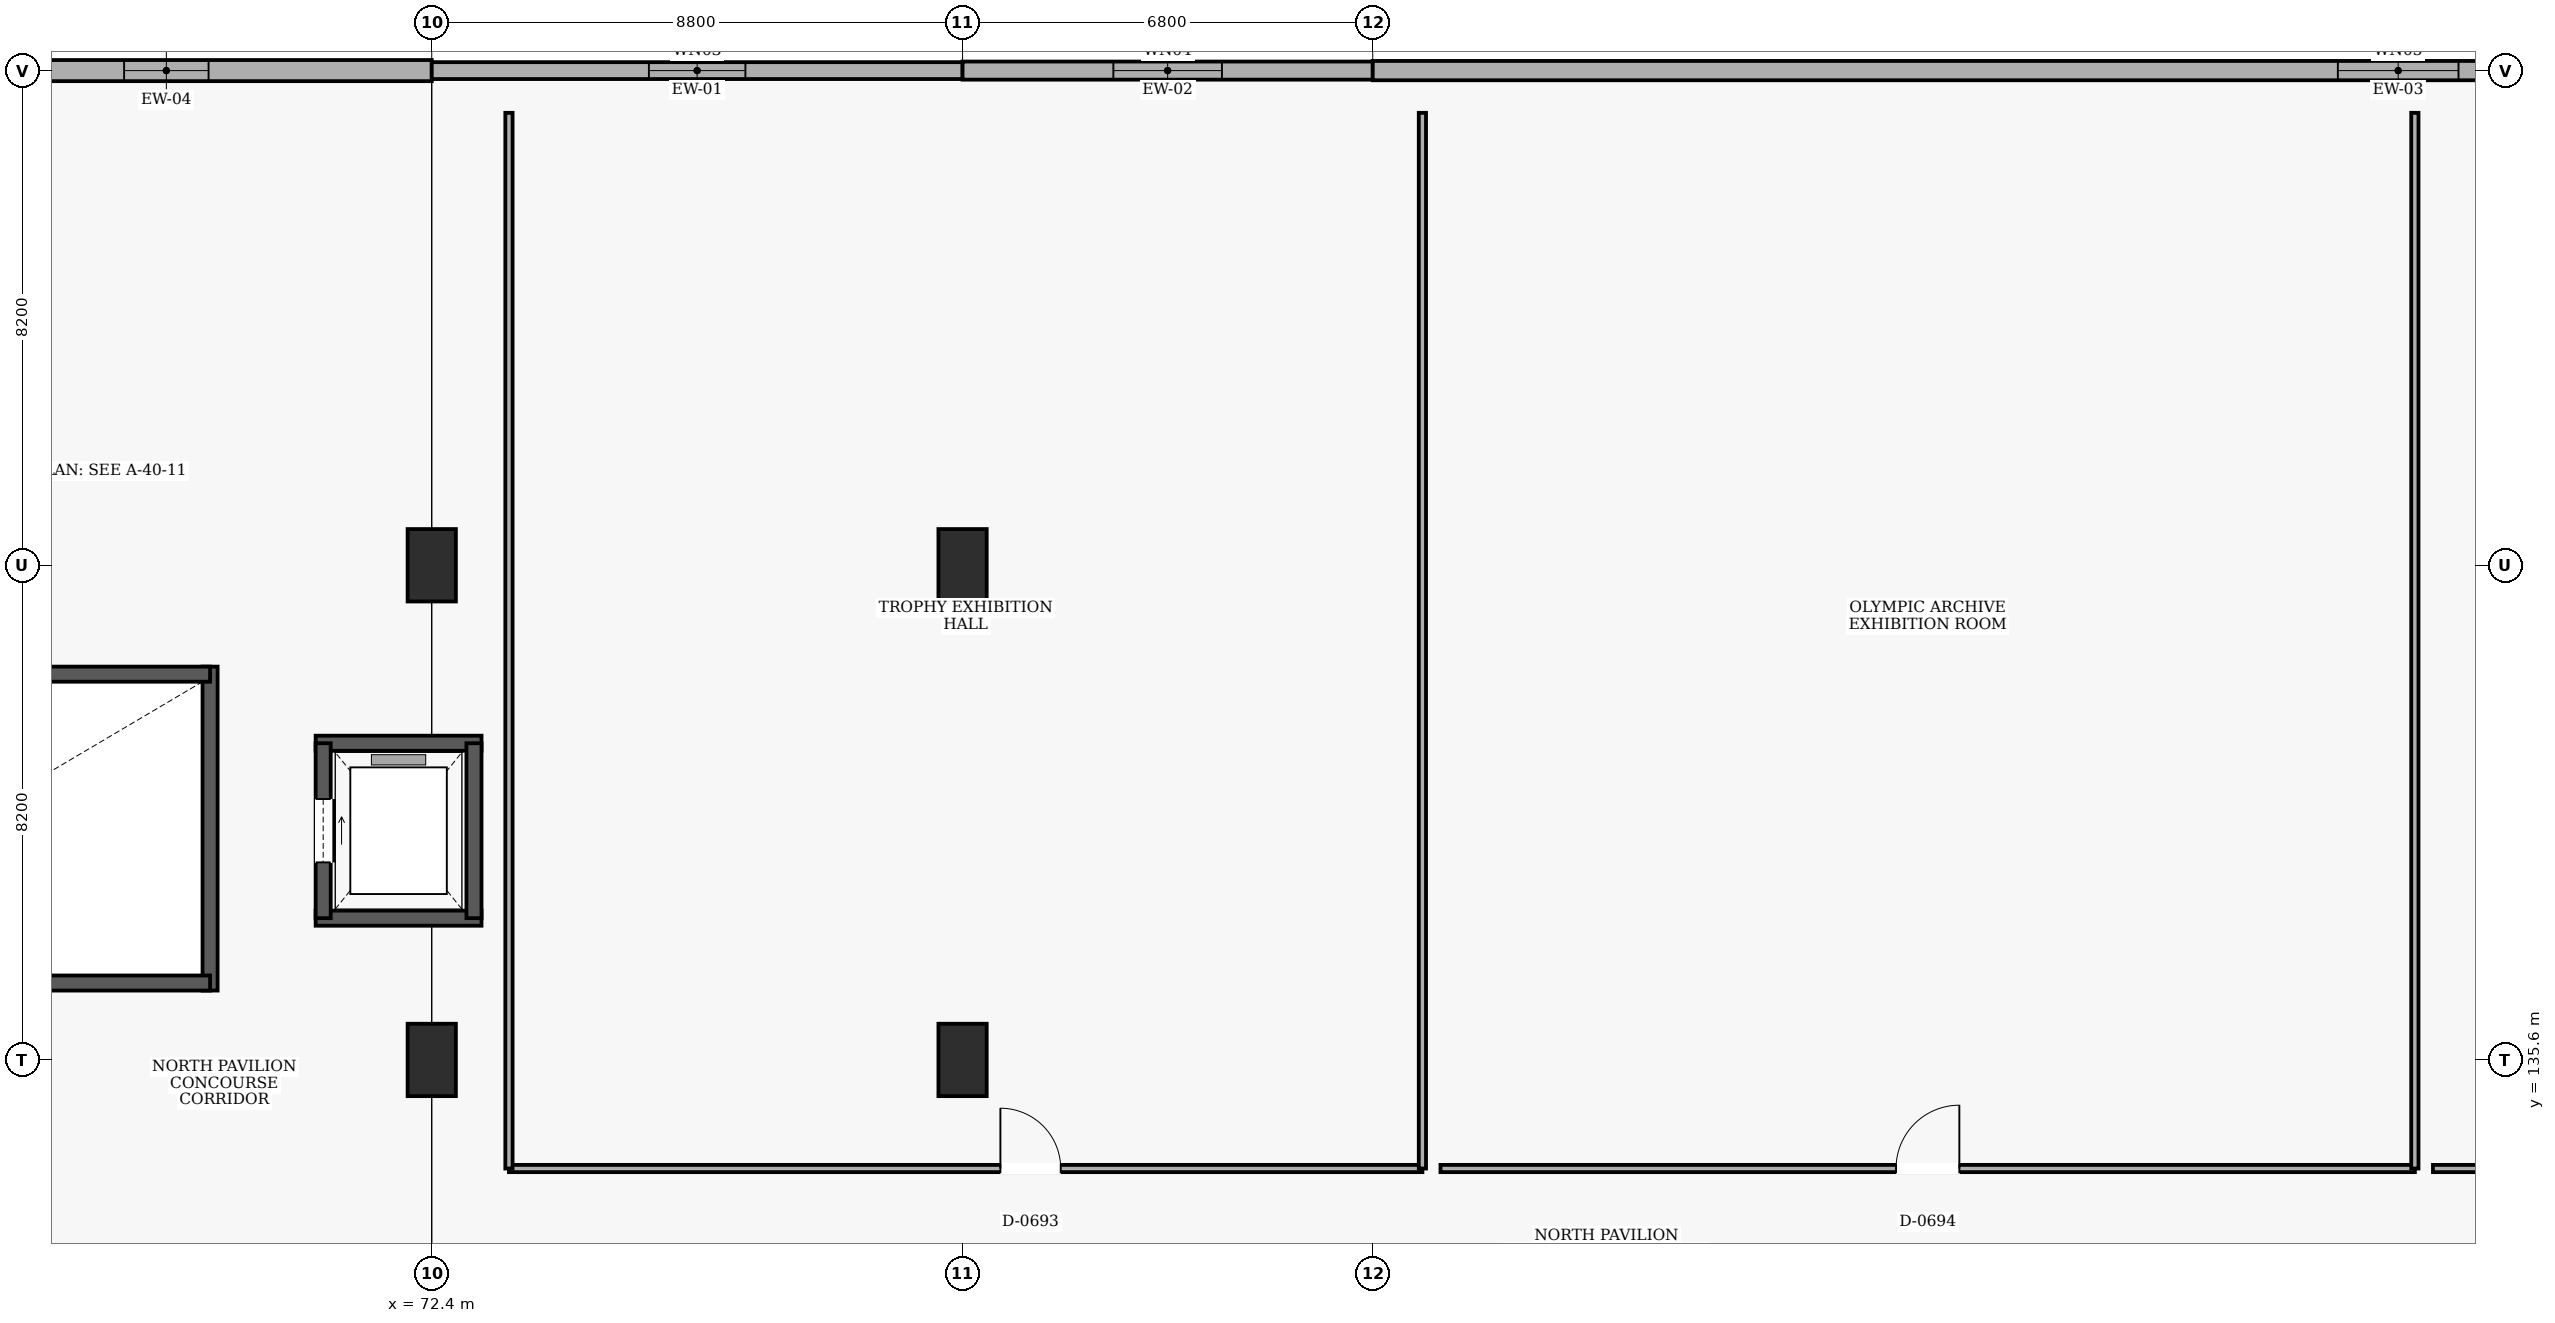
"""IFC4 building model, lengths in metres.
Left out: names, types, materials, properties, quantities, classifications, styles, units other than length and angle.
Written with IfcOpenShell. Run it as: python <this file> out.ifc"""

import sys

from ifc_helpers import new_model, si_unit, direction, frame, frame_2d, origin, origin_2d, place, context, subcontext, project, spatial, rectangle, extrude, element, fill, save


model = new_model("IFC4")
c1 = context("Model", 3, precision=1e-05, world=origin(), true_north=direction((0.0, 1.0)))
c2 = subcontext(c1, "Body", "Model", "MODEL_VIEW")
j1 = project(units=[si_unit("LENGTHUNIT", "METRE"), si_unit("PLANEANGLEUNIT", "RADIAN")], contexts=[c1])
p1 = place(None, origin())
s1 = spatial("IfcSite", under=j1, at=p1, CompositionType="ELEMENT")
p2 = place(p1, origin())
s2 = spatial("IfcBuilding", under=s1, at=p2, CompositionType="ELEMENT")
p3 = place(p2, frame((0.0, 0.0, 15.0)))
s3 = spatial("IfcBuildingStorey", under=s2, at=p3, CompositionType="ELEMENT", Elevation=15.0)
for number, where, z_axis, x_axis in (
    (1, (72.4, 135.6, 0.0), (0.0, 0.0, 1.0), (1.0, 0.0, 0.0)),
    (2, (72.4, 143.8, 0.0), (0.0, 0.0, 1.0), (1.0, 0.0, 0.0)),
    (3, (81.2, 135.6, 0.0), (0.0, 0.0, 1.0), (1.0, 0.0, 0.0)),
    (4, (81.2, 143.8, 0.0), (0.0, 0.0, 1.0), (1.0, 0.0, 0.0)),
):
    element("IfcColumn", number, at=place(p3, frame(where, z_axis=z_axis, x_axis=x_axis)), inside=s3, PredefinedType="COLUMN", context=c2, shape_type="SweptSolid", body=[
        extrude(rectangle(XDim=0.8, YDim=1.2, at=origin_2d()), origin(), (0.0, 0.0, 1.0), 4.8),
    ])
p4 = place(p3, frame((63.6, 152.0, 0.0), z_axis=(0.0, 0.0, 1.0), x_axis=(1.0, 0.0, 0.0)))
e5 = element("IfcWall", 5, at=p4, inside=s3, PredefinedType="SOLIDWALL", context=c2, shape_type="SweptSolid", body=[
    extrude(rectangle(XDim=8.8, YDim=0.35, at=frame_2d((4.4, 0.0))), origin(), (0.0, 0.0, 1.0), 4.48),
])
p5 = place(p4, frame((3.7, 0.0, 0.9)))
e6 = element("IfcOpeningElement", 6, at=p5, cuts=e5, PredefinedType="OPENING", context=c2, shape_type="SweptSolid", body=[
    extrude(rectangle(XDim=1.4, YDim=1.5, at=frame_2d((0.7, 0.75))), frame((0.0, 0.185, 0.0), z_axis=(0.0, -1.0, 0.0), x_axis=(1.0, 0.0, 0.0)), (0.0, 0.0, 1.0), 0.37),
])
p6 = place(p3, frame((72.4, 152.0, 0.0), z_axis=(0.0, 0.0, 1.0), x_axis=(1.0, 0.0, 0.0)))
e7 = element("IfcWall", 7, at=p6, inside=s3, PredefinedType="SOLIDWALL", context=c2, shape_type="SweptSolid", body=[
    extrude(rectangle(XDim=8.8, YDim=0.28, at=frame_2d((4.4, 0.0))), origin(), (0.0, 0.0, 1.0), 4.48),
])
p7 = place(p6, frame((3.6, 0.0, 0.9)))
e8 = element("IfcOpeningElement", 8, at=p7, cuts=e7, PredefinedType="OPENING", context=c2, shape_type="SweptSolid", body=[
    extrude(rectangle(XDim=1.6, YDim=1.5, at=frame_2d((0.8, 0.75))), frame((0.0, 0.15, 0.0), z_axis=(0.0, -1.0, 0.0), x_axis=(1.0, 0.0, 0.0)), (0.0, 0.0, 1.0), 0.3),
])
p8 = place(p3, frame((81.2, 152.0, 0.0), z_axis=(0.0, 0.0, 1.0), x_axis=(1.0, 0.0, 0.0)))
e9 = element("IfcWall", 9, at=p8, inside=s3, PredefinedType="SOLIDWALL", context=c2, shape_type="SweptSolid", body=[
    extrude(rectangle(XDim=6.8, YDim=0.3, at=frame_2d((3.4, 0.0))), origin(), (0.0, 0.0, 1.0), 4.48),
])
p9 = place(p8, frame((2.5, 0.0, 0.9)))
e10 = element("IfcOpeningElement", 10, at=p9, cuts=e9, PredefinedType="OPENING", context=c2, shape_type="SweptSolid", body=[
    extrude(rectangle(XDim=1.8, YDim=1.5, at=frame_2d((0.9, 0.75))), frame((0.0, 0.16, 0.0), z_axis=(0.0, -1.0, 0.0), x_axis=(1.0, 0.0, 0.0)), (0.0, 0.0, 1.0), 0.32),
])
p10 = place(p3, frame((88.0, 152.0, 0.0), z_axis=(0.0, 0.0, 1.0), x_axis=(1.0, 0.0, 0.0)))
e11 = element("IfcWall", 11, at=p10, inside=s3, PredefinedType="SOLIDWALL", context=c2, shape_type="SweptSolid", body=[
    extrude(rectangle(XDim=34.0, YDim=0.32, at=frame_2d((17.0, 0.0))), origin(), (0.0, 0.0, 1.0), 4.48),
])
p11 = place(p10, frame((16.0, 0.0, 0.9)))
e12 = element("IfcOpeningElement", 12, at=p11, cuts=e11, PredefinedType="OPENING", context=c2, shape_type="SweptSolid", body=[
    extrude(rectangle(XDim=2.0, YDim=1.5, at=frame_2d((1.0, 0.75))), frame((0.0, 0.17, 0.0), z_axis=(0.0, -1.0, 0.0), x_axis=(1.0, 0.0, 0.0)), (0.0, 0.0, 1.0), 0.34),
])
p12 = place(p3, frame((68.725, 136.75, 0.0), z_axis=(0.0, 0.0, 1.0), x_axis=(0.0, 1.0, 0.0)))
e13 = element("IfcWall", 13, at=p12, inside=s3, PredefinedType="SHEAR", context=c2, shape_type="SweptSolid", body=[
    extrude(rectangle(XDim=5.37, YDim=0.25, at=frame_2d((2.685, 0.0))), origin(), (0.0, 0.0, 1.0), 4.5),
])
p13 = place(p3, frame((57.875, 141.995, 0.0), z_axis=(0.0, 0.0, 1.0), x_axis=(1.0, 0.0, 0.0)))
e14 = element("IfcWall", 14, at=p13, inside=s3, PredefinedType="SHEAR", context=c2, shape_type="SweptSolid", body=[
    extrude(rectangle(XDim=10.85, YDim=0.25, at=frame_2d((5.425, 0.0))), origin(), (0.0, 0.0, 1.0), 4.5),
])
p14 = place(p3, frame((57.875, 136.875, 0.0), z_axis=(0.0, 0.0, 1.0), x_axis=(1.0, 0.0, 0.0)))
e15 = element("IfcWall", 15, at=p14, inside=s3, PredefinedType="SHEAR", context=c2, shape_type="SweptSolid", body=[
    extrude(rectangle(XDim=10.85, YDim=0.25, at=frame_2d((5.425, 0.0))), origin(), (0.0, 0.0, 1.0), 4.5),
])
p15 = place(p14, frame((0.52, 0.0, 0.0)))
e16 = element("IfcOpeningElement", 16, at=p15, cuts=e15, PredefinedType="OPENING", context=c2, shape_type="SweptSolid", body=[
    extrude(rectangle(XDim=1.4, YDim=2.15, at=frame_2d((0.7, 1.075))), frame((0.0, 0.135, 0.0), z_axis=(0.0, -1.0, 0.0), x_axis=(1.0, 0.0, 0.0)), (0.0, 0.0, 1.0), 0.27),
])
for number, where, z_axis, x_axis in (
    (17, (70.475, 137.95, 0.0), (0.0, 0.0, 1.0), (1.0, 0.0, 0.0)),
    (18, (73.225, 140.85, 0.0), (0.0, 0.0, 1.0), (-1.0, 0.0, 0.0)),
):
    element("IfcWall", number, at=place(p3, frame(where, z_axis=z_axis, x_axis=x_axis)), inside=s3, PredefinedType="SHEAR", context=c2, shape_type="SweptSolid", body=[
        extrude(rectangle(XDim=2.75, YDim=0.25, at=frame_2d((1.375, 0.0))), origin(), (0.0, 0.0, 1.0), 4.5),
    ])
p16 = place(p3, frame((70.6, 140.85, 0.0), z_axis=(0.0, 0.0, 1.0), x_axis=(0.0, -1.0, 0.0)))
e19 = element("IfcWall", 19, at=p16, inside=s3, PredefinedType="SHEAR", context=c2, shape_type="SweptSolid", body=[
    extrude(rectangle(XDim=2.9, YDim=0.25, at=frame_2d((1.45, 0.0))), origin(), (0.0, 0.0, 1.0), 4.5),
])
p17 = place(p16, frame((0.925, 0.0, 0.0)))
e20 = element("IfcOpeningElement", 20, at=p17, cuts=e19, PredefinedType="OPENING", context=c2, shape_type="SweptSolid", body=[
    extrude(rectangle(XDim=1.05, YDim=2.15, at=frame_2d((0.525, 1.075))), frame((0.0, 0.135, 0.0), z_axis=(0.0, -1.0, 0.0), x_axis=(1.0, 0.0, 0.0)), (0.0, 0.0, 1.0), 0.27),
])
p18 = place(p3, frame((73.1, 137.95, 0.0), z_axis=(0.0, 0.0, 1.0), x_axis=(0.0, 1.0, 0.0)))
e21 = element("IfcWall", 21, at=p18, inside=s3, PredefinedType="SHEAR", context=c2, shape_type="SweptSolid", body=[
    extrude(rectangle(XDim=2.9, YDim=0.25, at=frame_2d((1.45, 0.0))), origin(), (0.0, 0.0, 1.0), 4.5),
])
p19 = place(p3, frame((73.68, 133.8, 0.0), z_axis=(0.0, 0.0, 1.0), x_axis=(1.0, 0.0, 0.0)))
e22 = element("IfcWall", 22, at=p19, inside=s3, PredefinedType="PARTITIONING", context=c2, shape_type="SweptSolid", body=[
    extrude(rectangle(XDim=15.143, YDim=0.12, at=frame_2d((7.572, 0.0))), origin(), (0.0, 0.0, 1.0), 4.5),
])
p20 = place(p19, frame((8.147, 0.0, 0.0)))
e23 = element("IfcOpeningElement", 23, at=p20, cuts=e22, PredefinedType="OPENING", context=c2, shape_type="SweptSolid", body=[
    extrude(rectangle(XDim=1.0, YDim=2.1, at=frame_2d((0.5, 1.05))), frame((0.0, 0.07, 0.0), z_axis=(0.0, -1.0, 0.0), x_axis=(1.0, 0.0, 0.0)), (0.0, 0.0, 1.0), 0.14),
])
for number, where, z_axis, x_axis in (
    (24, (88.823, 133.8, 0.0), (0.0, 0.0, 1.0), (0.0, 1.0, 0.0)),
    (25, (73.68, 151.3, 0.0), (0.0, 0.0, 1.0), (0.0, -1.0, 0.0)),
):
    element("IfcWall", number, at=place(p3, frame(where, z_axis=z_axis, x_axis=x_axis)), inside=s3, PredefinedType="PARTITIONING", context=c2, shape_type="SweptSolid", body=[
        extrude(rectangle(XDim=17.5, YDim=0.12, at=frame_2d((8.75, 0.0))), origin(), (0.0, 0.0, 1.0), 4.5),
    ])
p21 = place(p3, frame((89.123, 133.8, 0.0), z_axis=(0.0, 0.0, 1.0), x_axis=(1.0, 0.0, 0.0)))
e26 = element("IfcWall", 26, at=p21, inside=s3, PredefinedType="PARTITIONING", context=c2, shape_type="SweptSolid", body=[
    extrude(rectangle(XDim=16.153, YDim=0.12, at=frame_2d((8.077, 0.0))), origin(), (0.0, 0.0, 1.0), 4.5),
])
p22 = place(p21, frame((7.552, 0.0, 0.0)))
e27 = element("IfcOpeningElement", 27, at=p22, cuts=e26, PredefinedType="OPENING", context=c2, shape_type="SweptSolid", body=[
    extrude(rectangle(XDim=1.05, YDim=2.15, at=frame_2d((0.525, 1.075))), frame((0.0, 0.07, 0.0), z_axis=(0.0, -1.0, 0.0), x_axis=(1.0, 0.0, 0.0)), (0.0, 0.0, 1.0), 0.14),
])
p23 = place(p3, frame((105.277, 133.8, 0.0), z_axis=(0.0, 0.0, 1.0), x_axis=(0.0, 1.0, 0.0)))
e28 = element("IfcWall", 28, at=p23, inside=s3, PredefinedType="PARTITIONING", context=c2, shape_type="SweptSolid", body=[
    extrude(rectangle(XDim=17.5, YDim=0.12, at=frame_2d((8.75, 0.0))), origin(), (0.0, 0.0, 1.0), 4.5),
])
p24 = place(p3, frame((105.577, 133.8, 0.0), z_axis=(0.0, 0.0, 1.0), x_axis=(1.0, 0.0, 0.0)))
e29 = element("IfcWall", 29, at=p24, inside=s3, PredefinedType="PARTITIONING", context=c2, shape_type="SweptSolid", body=[
    extrude(rectangle(XDim=16.153, YDim=0.12, at=frame_2d((8.077, 0.0))), origin(), (0.0, 0.0, 1.0), 4.5),
])
p25 = place(p24, frame((7.517, 0.0, 0.0)))
e30 = element("IfcOpeningElement", 30, at=p25, cuts=e29, PredefinedType="OPENING", context=c2, shape_type="SweptSolid", body=[
    extrude(rectangle(XDim=1.12, YDim=2.15, at=frame_2d((0.56, 1.075))), frame((0.0, 0.07, 0.0), z_axis=(0.0, -1.0, 0.0), x_axis=(1.0, 0.0, 0.0)), (0.0, 0.0, 1.0), 0.14),
])
p26 = place(p5, origin())
e31 = element("IfcWindow", 31, at=p26, inside=s3, PartitioningType="SINGLE_PANEL", PredefinedType="WINDOW", context=c2, shape_type="SweptSolid", body=[
    extrude(rectangle(XDim=1.4, YDim=1.5, at=frame_2d((0.7, 0.75))), frame((0.0, 0.03, 0.0), z_axis=(0.0, -1.0, 0.0), x_axis=(1.0, 0.0, 0.0)), (0.0, 0.0, 1.0), 0.06),
])
fill(e6, e31)
p27 = place(p7, origin())
e32 = element("IfcWindow", 32, at=p27, inside=s3, PartitioningType="SINGLE_PANEL", PredefinedType="WINDOW", context=c2, shape_type="SweptSolid", body=[
    extrude(rectangle(XDim=1.6, YDim=1.5, at=frame_2d((0.8, 0.75))), frame((0.0, 0.03, 0.0), z_axis=(0.0, -1.0, 0.0), x_axis=(1.0, 0.0, 0.0)), (0.0, 0.0, 1.0), 0.06),
])
fill(e8, e32)
p28 = place(p9, origin())
e33 = element("IfcWindow", 33, at=p28, inside=s3, PartitioningType="SINGLE_PANEL", PredefinedType="WINDOW", context=c2, shape_type="SweptSolid", body=[
    extrude(rectangle(XDim=1.8, YDim=1.5, at=frame_2d((0.9, 0.75))), frame((0.0, 0.03, 0.0), z_axis=(0.0, -1.0, 0.0), x_axis=(1.0, 0.0, 0.0)), (0.0, 0.0, 1.0), 0.06),
])
fill(e10, e33)
p29 = place(p11, origin())
e34 = element("IfcWindow", 34, at=p29, inside=s3, PartitioningType="SINGLE_PANEL", PredefinedType="WINDOW", context=c2, shape_type="SweptSolid", body=[
    extrude(rectangle(XDim=2.0, YDim=1.5, at=frame_2d((1.0, 0.75))), frame((0.0, 0.03, 0.0), z_axis=(0.0, -1.0, 0.0), x_axis=(1.0, 0.0, 0.0)), (0.0, 0.0, 1.0), 0.06),
])
fill(e12, e34)
p30 = place(p17, origin())
e35 = element("IfcDoor", 35, at=p30, inside=s3, OperationType="SLIDING_TO_RIGHT", PredefinedType="DOOR", context=c2, shape_type="SweptSolid", body=[
    extrude(rectangle(XDim=1.05, YDim=2.15, at=frame_2d((0.525, 1.075))), frame((0.0, 0.025, 0.0), z_axis=(0.0, -1.0, 0.0), x_axis=(1.0, 0.0, 0.0)), (0.0, 0.0, 1.0), 0.05),
])
fill(e20, e35)
p31 = place(p20, origin())
e36 = element("IfcDoor", 36, at=p31, inside=s3, OperationType="SINGLE_SWING_LEFT", PredefinedType="DOOR", context=c2, shape_type="SweptSolid", body=[
    extrude(rectangle(XDim=1.0, YDim=2.1, at=frame_2d((0.5, 1.05))), frame((0.0, 0.025, 0.0), z_axis=(0.0, -1.0, 0.0), x_axis=(1.0, 0.0, 0.0)), (0.0, 0.0, 1.0), 0.05),
])
fill(e23, e36)
p32 = place(p22, origin())
e37 = element("IfcDoor", 37, at=p32, inside=s3, OperationType="SINGLE_SWING_RIGHT", PredefinedType="DOOR", context=c2, shape_type="SweptSolid", body=[
    extrude(rectangle(XDim=1.05, YDim=2.15, at=frame_2d((0.525, 1.075))), frame((0.0, 0.025, 0.0), z_axis=(0.0, -1.0, 0.0), x_axis=(1.0, 0.0, 0.0)), (0.0, 0.0, 1.0), 0.05),
])
fill(e27, e37)
save(model, sys.argv[1])
